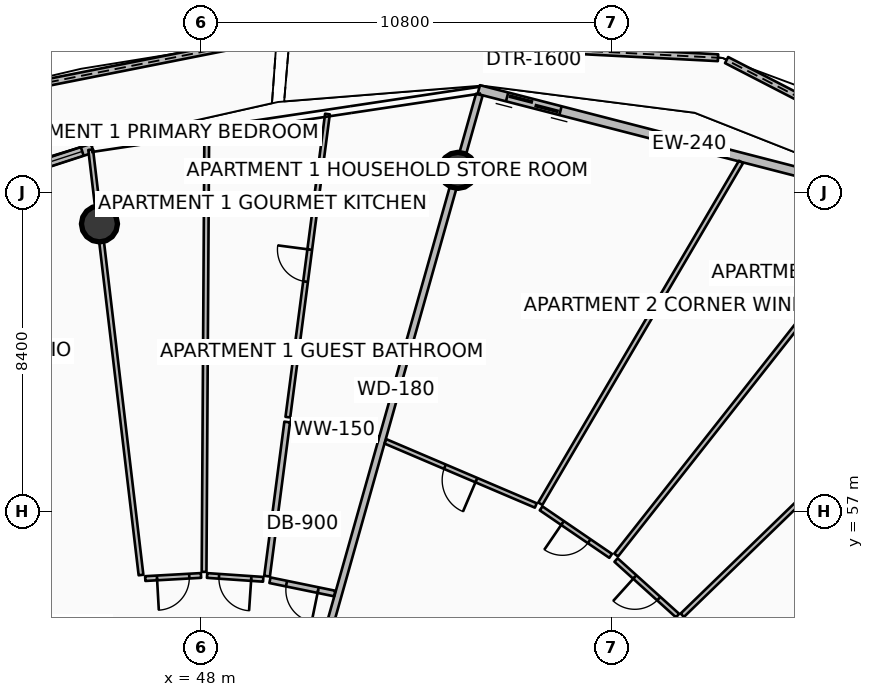
"""IFC4 building model, lengths in metres.
Left out: names, types, materials, properties, quantities, classifications, styles, units other than length and angle.
Written with IfcOpenShell. Run it as: python <this file> out.ifc"""

import sys

from ifc_helpers import new_model, si_unit, direction, frame, frame_2d, origin, origin_2d, place, context, subcontext, project, spatial, polyline, rectangle, circle, outline, extrude, element, fill, save


model = new_model("IFC4")
c1 = context("Model", 3, precision=1e-05, world=origin(), true_north=direction((0.0, 1.0)))
c2 = subcontext(c1, "Body", "Model", "MODEL_VIEW")
j1 = project(units=[si_unit("LENGTHUNIT", "METRE"), si_unit("PLANEANGLEUNIT", "RADIAN")], contexts=[c1])
p1 = place(None, origin())
s1 = spatial("IfcSite", under=j1, at=p1, CompositionType="ELEMENT")
p2 = place(p1, origin())
s2 = spatial("IfcBuilding", under=s1, at=p2, CompositionType="ELEMENT")
p3 = place(p2, frame((0.0, 0.0, 302.15)))
s3 = spatial("IfcBuildingStorey", under=s2, at=p3, CompositionType="ELEMENT", Elevation=302.15)
p4 = place(p3, frame((54.763, 65.979, 0.0), z_axis=(-0.078380826243, -0.278024987813, 0.957370645168), x_axis=(0.962482662074, -0.271343187139, 0.0)))
e1 = element("IfcColumn", 1, at=p4, inside=s3, PredefinedType="COLUMN", context=c2, shape_type="SweptSolid", body=[
    extrude(circle(Radius=0.475, at=origin_2d()), origin(), (0.0, 0.0, 1.0), 3.604),
])
p5 = place(p3, frame((45.329, 64.571, 0.0), z_axis=(0.031178379012, -0.263549405081, 0.964141908519), x_axis=(0.993074942207, 0.117482590885, 0.0)))
e2 = element("IfcColumn", 2, at=p5, inside=s3, PredefinedType="COLUMN", context=c2, shape_type="SweptSolid", body=[
    extrude(circle(Radius=0.475, at=origin_2d()), origin(), (0.0, 0.0, 1.0), 3.579),
])
p6 = place(p3, frame((72.637, 63.304, 0.0), z_axis=(0.0, 0.0, 1.0), x_axis=(-0.888586869338, 0.458708377556, 0.0)))
e3 = element("IfcWall", 3, at=p6, inside=s3, PredefinedType="PARAPET", context=c2, shape_type="SweptSolid", body=[
    extrude(outline(polyline([(0.0, 0.0), (12.16, 0.0), (12.16, 1.148), (6.08, 1.284), (0.0, 1.483), (0.0, 0.0)])), frame((0.0, 0.09, 0.0), z_axis=(0.0, -1.0, 0.0), x_axis=(1.0, 0.0, 0.0)), (0.0, 0.0, 1.0), 0.18),
])
p7 = place(p3, frame((61.605, 68.943, 0.0), z_axis=(0.0, 0.0, 1.0), x_axis=(-0.998675719667, 0.051447127692, 0.0)))
e4 = element("IfcWall", 4, at=p7, inside=s3, PredefinedType="PARAPET", context=c2, shape_type="SweptSolid", body=[
    extrude(outline(polyline([(0.0, 0.0), (11.285, 0.0), (11.285, 1.224), (5.642, 1.127), (0.0, 1.148), (0.0, 0.0)])), frame((0.0, 0.09, 0.0), z_axis=(0.0, -1.0, 0.0), x_axis=(1.0, 0.0, 0.0)), (0.0, 0.0, 1.0), 0.18),
])
p8 = place(p3, frame((49.994, 69.486, 0.0), z_axis=(0.0, 0.0, 1.0), x_axis=(-0.980919619001, -0.194413736807, 0.0)))
e5 = element("IfcWall", 5, at=p8, inside=s3, PredefinedType="PARAPET", context=c2, shape_type="SweptSolid", body=[
    extrude(outline(polyline([(0.0, 0.0), (10.344, 0.0), (10.344, 1.632), (5.172, 1.418), (0.0, 1.233), (0.0, 0.0)])), frame((0.0, 0.09, 0.0), z_axis=(0.0, -1.0, 0.0), x_axis=(1.0, 0.0, 0.0)), (0.0, 0.0, 1.0), 0.18),
])
p9 = place(p3, frame((66.386, 65.249, 0.0), z_axis=(0.0, 0.0, 1.0), x_axis=(-0.968343758421, 0.249620442927, 0.0)))
e6 = element("IfcWall", 6, at=p9, inside=s3, PredefinedType="SOLIDWALL", context=c2, shape_type="SweptSolid", body=[
    extrude(rectangle(XDim=11.438, YDim=0.24, at=frame_2d((5.719, 0.0))), origin(), (0.0, 0.0, 1.0), 2.4),
])
p10 = place(p9, frame((9.218, 0.0, 0.0)))
e7 = element("IfcOpeningElement", 7, at=p10, cuts=e6, PredefinedType="OPENING", context=c2, shape_type="SweptSolid", body=[
    extrude(rectangle(XDim=1.45, YDim=2.15, at=frame_2d((0.725, 1.075))), frame((0.0, 0.13, 0.0), z_axis=(0.0, -1.0, 0.0), x_axis=(1.0, 0.0, 0.0)), (0.0, 0.0, 1.0), 0.26),
])
p11 = place(p9, frame((0.28, 0.0, 0.65)))
e8 = element("IfcOpeningElement", 8, at=p11, cuts=e6, PredefinedType="OPENING", context=c2, shape_type="SweptSolid", body=[
    extrude(rectangle(XDim=1.6, YDim=1.5, at=frame_2d((0.8, 0.75))), frame((0.0, 0.13, 0.0), z_axis=(0.0, -1.0, 0.0), x_axis=(1.0, 0.0, 0.0)), (0.0, 0.0, 1.0), 0.26),
])
p12 = place(p3, frame((45.142, 66.564, 0.0), z_axis=(0.0, 0.0, 1.0), x_axis=(-0.951055974609, -0.309018661507, 0.0)))
e9 = element("IfcWall", 9, at=p12, inside=s3, PredefinedType="SOLIDWALL", context=c2, shape_type="SweptSolid", body=[
    extrude(rectangle(XDim=9.745, YDim=0.24, at=frame_2d((4.873, 0.0))), origin(), (0.0, 0.0, 1.0), 2.4),
])
p13 = place(p12, frame((7.525, 0.0, 0.0)))
e10 = element("IfcOpeningElement", 10, at=p13, cuts=e9, PredefinedType="OPENING", context=c2, shape_type="SweptSolid", body=[
    extrude(rectangle(XDim=1.45, YDim=2.15, at=frame_2d((0.725, 1.075))), frame((0.0, 0.13, 0.0), z_axis=(0.0, -1.0, 0.0), x_axis=(1.0, 0.0, 0.0)), (0.0, 0.0, 1.0), 0.26),
])
p14 = place(p12, frame((0.28, 0.0, 0.65)))
e11 = element("IfcOpeningElement", 11, at=p14, cuts=e9, PredefinedType="OPENING", context=c2, shape_type="SweptSolid", body=[
    extrude(rectangle(XDim=1.6, YDim=1.5, at=frame_2d((0.8, 0.75))), frame((0.0, 0.13, 0.0), z_axis=(0.0, -1.0, 0.0), x_axis=(1.0, 0.0, 0.0)), (0.0, 0.0, 1.0), 0.26),
])
p15 = place(p3, frame((50.935, 52.406, 0.0), z_axis=(0.0, 0.0, 1.0), x_axis=(0.27143972755, 0.962455440167, 0.0)))
e12 = element("IfcWall", 12, at=p15, inside=s3, PredefinedType="PARTITIONING", context=c2, shape_type="SweptSolid", body=[
    extrude(rectangle(XDim=16.173, YDim=0.18, at=frame_2d((8.086, 0.0))), origin(), (0.0, 0.0, 1.0), 2.407),
])
p16 = place(p3, frame((46.422, 55.332, 0.0), z_axis=(0.0, 0.0, 1.0), x_axis=(-0.117545090782, 0.99306754636, 0.0)))
e13 = element("IfcWall", 13, at=p16, inside=s3, PredefinedType="PARTITIONING", context=c2, shape_type="SweptSolid", body=[
    extrude(rectangle(XDim=11.27, YDim=0.125, at=frame_2d((5.635, 0.0))), origin(), (0.0, 0.0, 1.0), 2.407),
])
p17 = place(p3, frame((51.519, 54.845, 0.0), z_axis=(0.0, 0.0, 1.0), x_axis=(-0.979552357192, 0.201189412048, 0.0)))
e14 = element("IfcWall", 14, at=p17, inside=s3, PredefinedType="PARTITIONING", context=c2, shape_type="SweptSolid", body=[
    extrude(rectangle(XDim=1.739, YDim=0.15, at=frame_2d((0.87, 0.0))), origin(), (0.0, 0.0, 1.0), 2.407),
])
p18 = place(p17, frame((0.445, 0.0, 0.0)))
e15 = element("IfcOpeningElement", 15, at=p18, cuts=e14, PredefinedType="OPENING", context=c2, shape_type="SweptSolid", body=[
    extrude(rectangle(XDim=0.85, YDim=2.06, at=frame_2d((0.425, 1.03))), frame((0.0, 0.085, 0.0), z_axis=(0.0, -1.0, 0.0), x_axis=(1.0, 0.0, 0.0)), (0.0, 0.0, 1.0), 0.17),
])
p19 = place(p3, frame((52.664, 58.906, 0.0), z_axis=(0.0, 0.0, 1.0), x_axis=(-0.979585392817, 0.201028500912, 0.0)))
e16 = element("IfcWall", 16, at=p19, inside=s3, PredefinedType="PARTITIONING", context=c2, shape_type="SweptSolid", body=[
    extrude(rectangle(XDim=2.35, YDim=0.15, at=frame_2d((1.175, 0.0))), origin(), (0.0, 0.0, 1.0), 2.407),
])
p20 = place(p3, frame((49.739, 55.302, 0.0), z_axis=(0.0, 0.0, 1.0), x_axis=(0.129528016187, 0.991575762624, 0.0)))
e17 = element("IfcWall", 17, at=p20, inside=s3, PredefinedType="PARTITIONING", context=c2, shape_type="SweptSolid", body=[
    extrude(rectangle(XDim=4.09, YDim=0.15, at=frame_2d((2.045, 0.0))), origin(), (0.0, 0.0, 1.0), 2.89),
])
p21 = place(p3, frame((50.286, 59.486, 0.0), z_axis=(0.0, 0.0, 1.0), x_axis=(0.129610388033, 0.991564999036, 0.0)))
e18 = element("IfcWall", 18, at=p21, inside=s3, PredefinedType="PARTITIONING", context=c2, shape_type="SweptSolid", body=[
    extrude(rectangle(XDim=8.043, YDim=0.125, at=frame_2d((4.021, 0.0))), origin(), (0.0, 0.0, 1.0), 2.425),
])
p22 = place(p21, frame((3.596, 0.0, 0.0)))
e19 = element("IfcOpeningElement", 19, at=p22, cuts=e18, PredefinedType="OPENING", context=c2, shape_type="SweptSolid", body=[
    extrude(rectangle(XDim=0.85, YDim=2.06, at=frame_2d((0.425, 1.03))), frame((0.0, 0.073, 0.0), z_axis=(0.0, -1.0, 0.0), x_axis=(1.0, 0.0, 0.0)), (0.0, 0.0, 1.0), 0.145),
])
p23 = place(p3, frame((48.082, 55.415, 0.0), z_axis=(0.0, 0.0, 1.0), x_axis=(0.006098991746, 0.999981400977, 0.0)))
e20 = element("IfcWall", 20, at=p23, inside=s3, PredefinedType="PARTITIONING", context=c2, shape_type="SweptSolid", body=[
    extrude(rectangle(XDim=11.569, YDim=0.125, at=frame_2d((5.784, 0.0))), origin(), (0.0, 0.0, 1.0), 2.425),
])
p24 = place(p3, frame((49.637, 55.219, 0.0), z_axis=(0.0, 0.0, 1.0), x_axis=(-0.997687761927, 0.067964179549, 0.0)))
e21 = element("IfcWall", 21, at=p24, inside=s3, PredefinedType="PARTITIONING", context=c2, shape_type="SweptSolid", body=[
    extrude(rectangle(XDim=1.48, YDim=0.125, at=frame_2d((0.74, 0.0))), origin(), (0.0, 0.0, 1.0), 2.89),
])
p25 = place(p24, frame((0.315, 0.0, 0.0)))
e22 = element("IfcOpeningElement", 22, at=p25, cuts=e21, PredefinedType="OPENING", context=c2, shape_type="SweptSolid", body=[
    extrude(rectangle(XDim=0.85, YDim=2.06, at=frame_2d((0.425, 1.03))), frame((0.0, 0.073, 0.0), z_axis=(0.0, -1.0, 0.0), x_axis=(1.0, 0.0, 0.0)), (0.0, 0.0, 1.0), 0.145),
])
p26 = place(p3, frame((48.001, 55.32, 0.0), z_axis=(0.0, 0.0, 1.0), x_axis=(-0.998441385069, -0.0558103985, 0.0)))
e23 = element("IfcWall", 23, at=p26, inside=s3, PredefinedType="PARTITIONING", context=c2, shape_type="SweptSolid", body=[
    extrude(rectangle(XDim=1.47, YDim=0.125, at=frame_2d((0.735, 0.0))), origin(), (0.0, 0.0, 1.0), 2.89),
])
p27 = place(p26, frame((0.31, 0.0, 0.0)))
e24 = element("IfcOpeningElement", 24, at=p27, cuts=e23, PredefinedType="OPENING", context=c2, shape_type="SweptSolid", body=[
    extrude(rectangle(XDim=0.85, YDim=2.06, at=frame_2d((0.425, 1.03))), frame((0.0, 0.073, 0.0), z_axis=(0.0, -1.0, 0.0), x_axis=(1.0, 0.0, 0.0)), (0.0, 0.0, 1.0), 0.145),
])
p28 = place(p3, frame((63.396, 50.622, 0.0), z_axis=(0.0, 0.0, 1.0), x_axis=(0.872499176967, 0.4886155812, 0.0)))
e25 = element("IfcWall", 25, at=p28, inside=s3, PredefinedType="PARTITIONING", context=c2, shape_type="SweptSolid", body=[
    extrude(rectangle(XDim=12.784, YDim=0.125, at=frame_2d((6.392, 0.0))), origin(), (0.0, 0.0, 1.0), 2.407),
])
p29 = place(p3, frame((61.978, 52.754, 0.0), z_axis=(0.0, 0.0, 1.0), x_axis=(0.792559605076, 0.609794450944, 0.0)))
e26 = element("IfcWall", 26, at=p29, inside=s3, PredefinedType="PARTITIONING", context=c2, shape_type="SweptSolid", body=[
    extrude(rectangle(XDim=12.406, YDim=0.125, at=frame_2d((6.203, 0.0))), origin(), (0.0, 0.0, 1.0), 2.425),
])
p30 = place(p3, frame((60.665, 54.273, 0.0), z_axis=(0.0, 0.0, 1.0), x_axis=(0.718133524399, 0.695905339205, 0.0)))
e27 = element("IfcWall", 27, at=p30, inside=s3, PredefinedType="PARTITIONING", context=c2, shape_type="SweptSolid", body=[
    extrude(rectangle(XDim=11.972, YDim=0.125, at=frame_2d((5.986, 0.0))), origin(), (0.0, 0.0, 1.0), 2.425),
])
p31 = place(p3, frame((60.541, 54.264, 0.0), z_axis=(0.0, 0.0, 1.0), x_axis=(-0.742235558018, 0.670139072443, 0.0)))
e28 = element("IfcWall", 28, at=p31, inside=s3, PredefinedType="PARTITIONING", context=c2, shape_type="SweptSolid", body=[
    extrude(rectangle(XDim=2.181, YDim=0.125, at=frame_2d((1.09, 0.0))), origin(), (0.0, 0.0, 1.0), 2.407),
])
p32 = place(p31, frame((0.666, 0.0, 0.0)))
e29 = element("IfcOpeningElement", 29, at=p32, cuts=e28, PredefinedType="OPENING", context=c2, shape_type="SweptSolid", body=[
    extrude(rectangle(XDim=0.85, YDim=2.06, at=frame_2d((0.425, 1.03))), frame((0.0, 0.073, 0.0), z_axis=(0.0, -1.0, 0.0), x_axis=(1.0, 0.0, 0.0)), (0.0, 0.0, 1.0), 0.145),
])
p33 = place(p3, frame((58.925, 55.858, 0.0), z_axis=(0.0, 0.0, 1.0), x_axis=(0.619092993306, 0.785317684532, 0.0)))
e30 = element("IfcWall", 30, at=p33, inside=s3, PredefinedType="PARTITIONING", context=c2, shape_type="SweptSolid", body=[
    extrude(rectangle(XDim=11.95, YDim=0.125, at=frame_2d((5.975, 0.0))), origin(), (0.0, 0.0, 1.0), 2.407),
])
p34 = place(p3, frame((56.93, 57.208, 0.0), z_axis=(0.0, 0.0, 1.0), x_axis=(0.506337583603, 0.862335347432, 0.0)))
e31 = element("IfcWall", 31, at=p34, inside=s3, PredefinedType="PARTITIONING", context=c2, shape_type="SweptSolid", body=[
    extrude(rectangle(XDim=10.429, YDim=0.125, at=frame_2d((5.214, 0.0))), origin(), (0.0, 0.0, 1.0), 2.425),
])
p35 = place(p3, frame((58.78, 55.836, 0.0), z_axis=(0.0, 0.0, 1.0), x_axis=(-0.825777202557, 0.563996464295, 0.0)))
e32 = element("IfcWall", 32, at=p35, inside=s3, PredefinedType="PARTITIONING", context=c2, shape_type="SweptSolid", body=[
    extrude(rectangle(XDim=2.216, YDim=0.125, at=frame_2d((1.108, 0.0))), origin(), (0.0, 0.0, 1.0), 2.407),
])
p36 = place(p35, frame((0.683, 0.0, 0.0)))
e33 = element("IfcOpeningElement", 33, at=p36, cuts=e32, PredefinedType="OPENING", context=c2, shape_type="SweptSolid", body=[
    extrude(rectangle(XDim=0.85, YDim=2.06, at=frame_2d((0.425, 1.03))), frame((0.0, 0.073, 0.0), z_axis=(0.0, -1.0, 0.0), x_axis=(1.0, 0.0, 0.0)), (0.0, 0.0, 1.0), 0.145),
])
p37 = place(p3, frame((56.811, 57.162, 0.0), z_axis=(0.0, 0.0, 1.0), x_axis=(-0.919947770822, 0.392040940414, 0.0)))
e34 = element("IfcWall", 34, at=p37, inside=s3, PredefinedType="PARTITIONING", context=c2, shape_type="SweptSolid", body=[
    extrude(rectangle(XDim=4.3, YDim=0.125, at=frame_2d((2.15, 0.0))), origin(), (0.0, 0.0, 1.0), 2.407),
])
p38 = place(p37, frame((1.7, 0.0, 0.0)))
e35 = element("IfcOpeningElement", 35, at=p38, cuts=e34, PredefinedType="OPENING", context=c2, shape_type="SweptSolid", body=[
    extrude(rectangle(XDim=0.9, YDim=2.08, at=frame_2d((0.45, 1.04))), frame((0.0, 0.073, 0.0), z_axis=(0.0, -1.0, 0.0), x_axis=(1.0, 0.0, 0.0)), (0.0, 0.0, 1.0), 0.145),
])
p39 = place(p10, origin())
e36 = element("IfcDoor", 36, at=p39, inside=s3, OperationType="DOUBLE_DOOR_SLIDING", PredefinedType="DOOR", context=c2, shape_type="SweptSolid", body=[
    extrude(rectangle(XDim=1.45, YDim=2.15, at=frame_2d((0.725, 1.075))), frame((0.0, 0.025, 0.0), z_axis=(0.0, -1.0, 0.0), x_axis=(1.0, 0.0, 0.0)), (0.0, 0.0, 1.0), 0.05),
])
fill(e7, e36)
p40 = place(p14, origin())
e37 = element("IfcWindow", 37, at=p40, inside=s3, PartitioningType="SINGLE_PANEL", PredefinedType="WINDOW", context=c2, shape_type="SweptSolid", body=[
    extrude(rectangle(XDim=1.6, YDim=1.5, at=frame_2d((0.8, 0.75))), frame((0.0, 0.03, 0.0), z_axis=(0.0, -1.0, 0.0), x_axis=(1.0, 0.0, 0.0)), (0.0, 0.0, 1.0), 0.06),
])
fill(e11, e37)
p41 = place(p18, origin())
e38 = element("IfcDoor", 38, at=p41, inside=s3, OperationType="SINGLE_SWING_LEFT", PredefinedType="DOOR", context=c2, shape_type="SweptSolid", body=[
    extrude(rectangle(XDim=0.85, YDim=2.06, at=frame_2d((0.425, 1.03))), frame((0.0, 0.025, 0.0), z_axis=(0.0, -1.0, 0.0), x_axis=(1.0, 0.0, 0.0)), (0.0, 0.0, 1.0), 0.05),
])
fill(e15, e38)
p42 = place(p22, origin())
e39 = element("IfcDoor", 39, at=p42, inside=s3, OperationType="SINGLE_SWING_RIGHT", PredefinedType="DOOR", context=c2, shape_type="SweptSolid", body=[
    extrude(rectangle(XDim=0.85, YDim=2.06, at=frame_2d((0.425, 1.03))), frame((0.0, 0.025, 0.0), z_axis=(0.0, -1.0, 0.0), x_axis=(1.0, 0.0, 0.0)), (0.0, 0.0, 1.0), 0.05),
])
fill(e19, e39)
p43 = place(p25, origin())
e40 = element("IfcDoor", 40, at=p43, inside=s3, OperationType="SINGLE_SWING_LEFT", PredefinedType="DOOR", context=c2, shape_type="SweptSolid", body=[
    extrude(rectangle(XDim=0.85, YDim=2.06, at=frame_2d((0.425, 1.03))), frame((0.0, 0.025, 0.0), z_axis=(0.0, -1.0, 0.0), x_axis=(1.0, 0.0, 0.0)), (0.0, 0.0, 1.0), 0.05),
])
fill(e22, e40)
p44 = place(p27, origin())
e41 = element("IfcDoor", 41, at=p44, inside=s3, OperationType="SINGLE_SWING_RIGHT", PredefinedType="DOOR", context=c2, shape_type="SweptSolid", body=[
    extrude(rectangle(XDim=0.85, YDim=2.06, at=frame_2d((0.425, 1.03))), frame((0.0, 0.025, 0.0), z_axis=(0.0, -1.0, 0.0), x_axis=(1.0, 0.0, 0.0)), (0.0, 0.0, 1.0), 0.05),
])
fill(e24, e41)
p45 = place(p32, origin())
e42 = element("IfcDoor", 42, at=p45, inside=s3, OperationType="SINGLE_SWING_RIGHT", PredefinedType="DOOR", context=c2, shape_type="SweptSolid", body=[
    extrude(rectangle(XDim=0.85, YDim=2.06, at=frame_2d((0.425, 1.03))), frame((0.0, 0.025, 0.0), z_axis=(0.0, -1.0, 0.0), x_axis=(1.0, 0.0, 0.0)), (0.0, 0.0, 1.0), 0.05),
])
fill(e29, e42)
p46 = place(p36, origin())
e43 = element("IfcDoor", 43, at=p46, inside=s3, OperationType="SINGLE_SWING_RIGHT", PredefinedType="DOOR", context=c2, shape_type="SweptSolid", body=[
    extrude(rectangle(XDim=0.85, YDim=2.06, at=frame_2d((0.425, 1.03))), frame((0.0, 0.025, 0.0), z_axis=(0.0, -1.0, 0.0), x_axis=(1.0, 0.0, 0.0)), (0.0, 0.0, 1.0), 0.05),
])
fill(e33, e43)
p47 = place(p38, origin())
e44 = element("IfcDoor", 44, at=p47, inside=s3, OperationType="SINGLE_SWING_LEFT", PredefinedType="DOOR", context=c2, shape_type="SweptSolid", body=[
    extrude(rectangle(XDim=0.9, YDim=2.08, at=frame_2d((0.45, 1.04))), frame((0.0, 0.025, 0.0), z_axis=(0.0, -1.0, 0.0), x_axis=(1.0, 0.0, 0.0)), (0.0, 0.0, 1.0), 0.05),
])
fill(e35, e44)
save(model, sys.argv[1])
